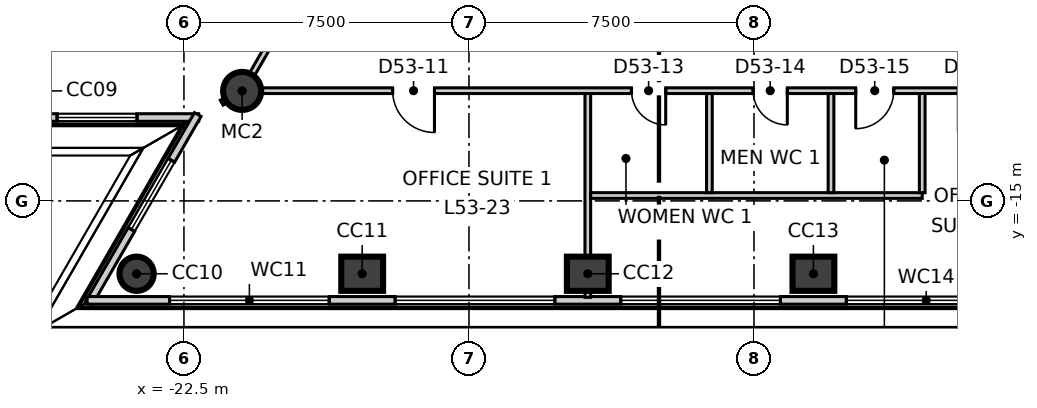
"""IFC4 building model, lengths in metres.
Left out: names, types, materials, properties, quantities, classifications, styles, units other than length and angle.
Written with IfcOpenShell. Run it as: python <this file> out.ifc"""

import sys

from ifc_helpers import new_model, si_unit, direction, frame, frame_2d, origin, origin_2d, place, context, subcontext, project, spatial, rectangle, circle, extrude, element, fill, save


model = new_model("IFC4")
c1 = context("Model", 3, precision=1e-05, world=origin(), true_north=direction((0.0, 1.0)))
c2 = subcontext(c1, "Body", "Model", "MODEL_VIEW")
j1 = project(units=[si_unit("LENGTHUNIT", "METRE"), si_unit("PLANEANGLEUNIT", "RADIAN")], contexts=[c1])
p1 = place(None, origin())
s1 = spatial("IfcSite", under=j1, at=p1, CompositionType="ELEMENT")
p2 = place(p1, origin())
s2 = spatial("IfcBuilding", under=s1, at=p2, CompositionType="ELEMENT")
p3 = place(p2, frame((0.0, 0.0, 227.3)))
s3 = spatial("IfcBuildingStorey", under=s2, at=p3, CompositionType="ELEMENT", Elevation=227.3)
p4 = place(p3, frame((-23.746, -16.917, -0.3), z_axis=(0.0, 0.0, 1.0), x_axis=(1.0, 0.0, 0.0)))
e1 = element("IfcColumn", 1, at=p4, inside=s3, PredefinedType="COLUMN", context=c2, shape_type="SweptSolid", body=[
    extrude(circle(Radius=0.45, at=origin_2d()), origin(), (0.0, 0.0, 1.0), 4.0),
])
for number, where, z_axis, x_axis in (
    (2, (-17.81, -16.917, -0.3), (0.0, 0.0, 1.0), (1.0, 0.0, 0.0)),
    (3, (-11.873, -16.917, -0.3), (0.0, 0.0, 1.0), (1.0, 0.0, 0.0)),
    (4, (-5.936, -16.917, -0.3), (0.0, 0.0, 1.0), (1.0, 0.0, 0.0)),
):
    element("IfcColumn", number, at=place(p3, frame(where, z_axis=z_axis, x_axis=x_axis)), inside=s3, PredefinedType="COLUMN", context=c2, shape_type="SweptSolid", body=[
        extrude(rectangle(XDim=1.1, YDim=0.9, at=origin_2d()), origin(), (0.0, 0.0, 1.0), 4.0),
    ])
p5 = place(p3, frame((-20.969, -12.106, -0.3), z_axis=(0.0, 0.0, 1.0), x_axis=(1.0, 0.0, 0.0)))
e5 = element("IfcColumn", 5, at=p5, inside=s3, PredefinedType="COLUMN", context=c2, shape_type="SweptSolid", body=[
    extrude(circle(Radius=0.5, at=origin_2d()), origin(), (0.0, 0.0, 1.0), 4.0),
])
p6 = place(p3, frame((-2.732, 30.501, 0.0), z_axis=(0.0, 0.0, 1.0), x_axis=(-0.500023345841, -0.866011924637, 0.0)))
e6 = element("IfcWall", 6, at=p6, inside=s3, PredefinedType="ELEMENTEDWALL", context=c2, shape_type="SweptSolid", body=[
    extrude(rectangle(XDim=50.078, YDim=0.2, at=frame_2d((25.039, 0.0))), origin(), (0.0, 0.0, 1.0), 3.7),
])
p7 = place(p6, frame((2.171, 0.0, 0.9)))
e7 = element("IfcOpeningElement", 7, at=p7, cuts=e6, PredefinedType="OPENING", context=c2, shape_type="SweptSolid", body=[
    extrude(rectangle(XDim=4.2, YDim=2.5, at=frame_2d((2.1, 1.25))), frame((0.0, 0.11, 0.0), z_axis=(0.0, -1.0, 0.0), x_axis=(1.0, 0.0, 0.0)), (0.0, 0.0, 1.0), 0.22),
])
p8 = place(p6, frame((8.107, 0.0, 0.9)))
e8 = element("IfcOpeningElement", 8, at=p8, cuts=e6, PredefinedType="OPENING", context=c2, shape_type="SweptSolid", body=[
    extrude(rectangle(XDim=4.2, YDim=2.5, at=frame_2d((2.1, 1.25))), frame((0.0, 0.11, 0.0), z_axis=(0.0, -1.0, 0.0), x_axis=(1.0, 0.0, 0.0)), (0.0, 0.0, 1.0), 0.22),
])
p9 = place(p6, frame((14.044, 0.0, 0.9)))
e9 = element("IfcOpeningElement", 9, at=p9, cuts=e6, PredefinedType="OPENING", context=c2, shape_type="SweptSolid", body=[
    extrude(rectangle(XDim=4.2, YDim=2.5, at=frame_2d((2.1, 1.25))), frame((0.0, 0.11, 0.0), z_axis=(0.0, -1.0, 0.0), x_axis=(1.0, 0.0, 0.0)), (0.0, 0.0, 1.0), 0.22),
])
p10 = place(p6, frame((19.98, 0.0, 0.9)))
e10 = element("IfcOpeningElement", 10, at=p10, cuts=e6, PredefinedType="OPENING", context=c2, shape_type="SweptSolid", body=[
    extrude(rectangle(XDim=4.2, YDim=2.5, at=frame_2d((2.1, 1.25))), frame((0.0, 0.11, 0.0), z_axis=(0.0, -1.0, 0.0), x_axis=(1.0, 0.0, 0.0)), (0.0, 0.0, 1.0), 0.22),
])
p11 = place(p6, frame((25.917, 0.0, 0.9)))
e11 = element("IfcOpeningElement", 11, at=p11, cuts=e6, PredefinedType="OPENING", context=c2, shape_type="SweptSolid", body=[
    extrude(rectangle(XDim=4.2, YDim=2.5, at=frame_2d((2.1, 1.25))), frame((0.0, 0.11, 0.0), z_axis=(0.0, -1.0, 0.0), x_axis=(1.0, 0.0, 0.0)), (0.0, 0.0, 1.0), 0.22),
])
p12 = place(p6, frame((31.853, 0.0, 0.9)))
e12 = element("IfcOpeningElement", 12, at=p12, cuts=e6, PredefinedType="OPENING", context=c2, shape_type="SweptSolid", body=[
    extrude(rectangle(XDim=4.2, YDim=2.5, at=frame_2d((2.1, 1.25))), frame((0.0, 0.11, 0.0), z_axis=(0.0, -1.0, 0.0), x_axis=(1.0, 0.0, 0.0)), (0.0, 0.0, 1.0), 0.22),
])
p13 = place(p6, frame((37.79, 0.0, 0.9)))
e13 = element("IfcOpeningElement", 13, at=p13, cuts=e6, PredefinedType="OPENING", context=c2, shape_type="SweptSolid", body=[
    extrude(rectangle(XDim=4.2, YDim=2.5, at=frame_2d((2.1, 1.25))), frame((0.0, 0.11, 0.0), z_axis=(0.0, -1.0, 0.0), x_axis=(1.0, 0.0, 0.0)), (0.0, 0.0, 1.0), 0.22),
])
p14 = place(p6, frame((43.726, 0.0, 0.9)))
e14 = element("IfcOpeningElement", 14, at=p14, cuts=e6, PredefinedType="OPENING", context=c2, shape_type="SweptSolid", body=[
    extrude(rectangle(XDim=4.2, YDim=2.5, at=frame_2d((2.1, 1.25))), frame((0.0, 0.11, 0.0), z_axis=(0.0, -1.0, 0.0), x_axis=(1.0, 0.0, 0.0)), (0.0, 0.0, 1.0), 0.22),
])
p15 = place(p3, frame((-27.827, -12.806, 0.0), z_axis=(0.0, 0.0, 1.0), x_axis=(1.0, 0.0, 0.0)))
e15 = element("IfcWall", 15, at=p15, inside=s3, PredefinedType="ELEMENTEDWALL", context=c2, shape_type="SweptSolid", body=[
    extrude(rectangle(XDim=5.715, YDim=0.2, at=frame_2d((2.857, 0.0))), origin(), (0.0, 0.0, 1.0), 3.7),
])
p16 = place(p15, frame((1.99, 0.0, 0.9)))
e16 = element("IfcOpeningElement", 16, at=p16, cuts=e15, PredefinedType="OPENING", context=c2, shape_type="SweptSolid", body=[
    extrude(rectangle(XDim=2.1, YDim=2.5, at=frame_2d((1.05, 1.25))), frame((0.0, 0.11, 0.0), z_axis=(0.0, -1.0, 0.0), x_axis=(1.0, 0.0, 0.0)), (0.0, 0.0, 1.0), 0.22),
])
p17 = place(p3, frame((-22.137, -12.728, 0.0), z_axis=(0.0, 0.0, 1.0), x_axis=(-0.49987899677, -0.866095253761, 0.0)))
e17 = element("IfcWall", 17, at=p17, inside=s3, PredefinedType="ELEMENTEDWALL", context=c2, shape_type="SweptSolid", body=[
    extrude(rectangle(XDim=5.715, YDim=0.2, at=frame_2d((2.858, 0.0))), origin(), (0.0, 0.0, 1.0), 3.7),
])
p18 = place(p17, frame((1.39, 0.0, 0.9)))
e18 = element("IfcOpeningElement", 18, at=p18, cuts=e17, PredefinedType="OPENING", context=c2, shape_type="SweptSolid", body=[
    extrude(rectangle(XDim=2.1, YDim=2.5, at=frame_2d((1.05, 1.25))), frame((0.0, 0.11, 0.0), z_axis=(0.0, -1.0, 0.0), x_axis=(1.0, 0.0, 0.0)), (0.0, 0.0, 1.0), 0.22),
])
p19 = place(p3, frame((-25.049, -17.617, 0.0), z_axis=(0.0, 0.0, 1.0), x_axis=(1.0, 0.0, 0.0)))
e19 = element("IfcWall", 19, at=p19, inside=s3, PredefinedType="ELEMENTEDWALL", context=c2, shape_type="SweptSolid", body=[
    extrude(rectangle(XDim=50.078, YDim=0.2, at=frame_2d((25.039, 0.0))), origin(), (0.0, 0.0, 1.0), 3.7),
])
p20 = place(p19, frame((2.171, 0.0, 0.9)))
e20 = element("IfcOpeningElement", 20, at=p20, cuts=e19, PredefinedType="OPENING", context=c2, shape_type="SweptSolid", body=[
    extrude(rectangle(XDim=4.2, YDim=2.5, at=frame_2d((2.1, 1.25))), frame((0.0, 0.11, 0.0), z_axis=(0.0, -1.0, 0.0), x_axis=(1.0, 0.0, 0.0)), (0.0, 0.0, 1.0), 0.22),
])
p21 = place(p19, frame((8.108, 0.0, 0.9)))
e21 = element("IfcOpeningElement", 21, at=p21, cuts=e19, PredefinedType="OPENING", context=c2, shape_type="SweptSolid", body=[
    extrude(rectangle(XDim=4.2, YDim=2.5, at=frame_2d((2.1, 1.25))), frame((0.0, 0.11, 0.0), z_axis=(0.0, -1.0, 0.0), x_axis=(1.0, 0.0, 0.0)), (0.0, 0.0, 1.0), 0.22),
])
p22 = place(p19, frame((14.044, 0.0, 0.9)))
e22 = element("IfcOpeningElement", 22, at=p22, cuts=e19, PredefinedType="OPENING", context=c2, shape_type="SweptSolid", body=[
    extrude(rectangle(XDim=4.2, YDim=2.5, at=frame_2d((2.1, 1.25))), frame((0.0, 0.11, 0.0), z_axis=(0.0, -1.0, 0.0), x_axis=(1.0, 0.0, 0.0)), (0.0, 0.0, 1.0), 0.22),
])
p23 = place(p19, frame((19.981, 0.0, 0.9)))
e23 = element("IfcOpeningElement", 23, at=p23, cuts=e19, PredefinedType="OPENING", context=c2, shape_type="SweptSolid", body=[
    extrude(rectangle(XDim=4.2, YDim=2.5, at=frame_2d((2.1, 1.25))), frame((0.0, 0.11, 0.0), z_axis=(0.0, -1.0, 0.0), x_axis=(1.0, 0.0, 0.0)), (0.0, 0.0, 1.0), 0.22),
])
p24 = place(p19, frame((25.917, 0.0, 0.9)))
e24 = element("IfcOpeningElement", 24, at=p24, cuts=e19, PredefinedType="OPENING", context=c2, shape_type="SweptSolid", body=[
    extrude(rectangle(XDim=4.2, YDim=2.5, at=frame_2d((2.1, 1.25))), frame((0.0, 0.11, 0.0), z_axis=(0.0, -1.0, 0.0), x_axis=(1.0, 0.0, 0.0)), (0.0, 0.0, 1.0), 0.22),
])
p25 = place(p19, frame((31.854, 0.0, 0.9)))
e25 = element("IfcOpeningElement", 25, at=p25, cuts=e19, PredefinedType="OPENING", context=c2, shape_type="SweptSolid", body=[
    extrude(rectangle(XDim=4.2, YDim=2.5, at=frame_2d((2.1, 1.25))), frame((0.0, 0.11, 0.0), z_axis=(0.0, -1.0, 0.0), x_axis=(1.0, 0.0, 0.0)), (0.0, 0.0, 1.0), 0.22),
])
p26 = place(p19, frame((37.79, 0.0, 0.9)))
e26 = element("IfcOpeningElement", 26, at=p26, cuts=e19, PredefinedType="OPENING", context=c2, shape_type="SweptSolid", body=[
    extrude(rectangle(XDim=4.2, YDim=2.5, at=frame_2d((2.1, 1.25))), frame((0.0, 0.11, 0.0), z_axis=(0.0, -1.0, 0.0), x_axis=(1.0, 0.0, 0.0)), (0.0, 0.0, 1.0), 0.22),
])
p27 = place(p19, frame((43.727, 0.0, 0.9)))
e27 = element("IfcOpeningElement", 27, at=p27, cuts=e19, PredefinedType="OPENING", context=c2, shape_type="SweptSolid", body=[
    extrude(rectangle(XDim=4.2, YDim=2.5, at=frame_2d((2.1, 1.25))), frame((0.0, 0.11, 0.0), z_axis=(0.0, -1.0, 0.0), x_axis=(1.0, 0.0, 0.0)), (0.0, 0.0, 1.0), 0.22),
])
p28 = place(p3, frame((-21.506, -12.416, 0.0), z_axis=(0.0, 0.0, 1.0), x_axis=(0.866102227088, 0.499866914522, 0.0)))
e28 = element("IfcWall", 28, at=p28, inside=s3, PredefinedType="PARTITIONING", context=c2, shape_type="SweptSolid", body=[
    extrude(rectangle(XDim=0.634, YDim=0.15, at=frame_2d((0.317, 0.0))), origin(), (0.0, 0.0, 1.0), 3.7),
])
p29 = place(p3, frame((-20.882, -11.969, 0.0), z_axis=(0.0, 0.0, 1.0), x_axis=(0.499998738735, 0.866026131975, 0.0)))
e29 = element("IfcWall", 29, at=p29, inside=s3, PredefinedType="PARTITIONING", context=c2, shape_type="SweptSolid", body=[
    extrude(rectangle(XDim=41.764, YDim=0.15, at=frame_2d((20.882, 0.0))), origin(), (0.0, 0.0, 1.0), 3.7),
])
p30 = place(p29, frame((33.714, 0.0, 0.0)))
e30 = element("IfcOpeningElement", 30, at=p30, cuts=e29, PredefinedType="OPENING", context=c2, shape_type="SweptSolid", body=[
    extrude(rectangle(XDim=1.1, YDim=2.1, at=frame_2d((0.55, 1.05))), frame((0.0, 0.085, 0.0), z_axis=(0.0, -1.0, 0.0), x_axis=(1.0, 0.0, 0.0)), (0.0, 0.0, 1.0), 0.17),
])
p31 = place(p29, frame((23.293, 0.0, 0.0)))
e31 = element("IfcOpeningElement", 31, at=p31, cuts=e29, PredefinedType="OPENING", context=c2, shape_type="SweptSolid", body=[
    extrude(rectangle(XDim=1.0, YDim=2.1, at=frame_2d((0.5, 1.05))), frame((0.0, 0.085, 0.0), z_axis=(0.0, -1.0, 0.0), x_axis=(1.0, 0.0, 0.0)), (0.0, 0.0, 1.0), 0.17),
])
p32 = place(p29, frame((13.356, 0.0, 0.0)))
e32 = element("IfcOpeningElement", 32, at=p32, cuts=e29, PredefinedType="OPENING", context=c2, shape_type="SweptSolid", body=[
    extrude(rectangle(XDim=1.1, YDim=2.1, at=frame_2d((0.55, 1.05))), frame((0.0, 0.085, 0.0), z_axis=(0.0, -1.0, 0.0), x_axis=(1.0, 0.0, 0.0)), (0.0, 0.0, 1.0), 0.17),
])
p33 = place(p29, frame((18.556, 0.0, 0.0)))
e33 = element("IfcOpeningElement", 33, at=p33, cuts=e29, PredefinedType="OPENING", context=c2, shape_type="SweptSolid", body=[
    extrude(rectangle(XDim=0.9, YDim=2.1, at=frame_2d((0.45, 1.05))), frame((0.0, 0.085, 0.0), z_axis=(0.0, -1.0, 0.0), x_axis=(1.0, 0.0, 0.0)), (0.0, 0.0, 1.0), 0.17),
])
p34 = place(p29, frame((15.556, 0.0, 0.0)))
e34 = element("IfcOpeningElement", 34, at=p34, cuts=e29, PredefinedType="OPENING", context=c2, shape_type="SweptSolid", body=[
    extrude(rectangle(XDim=0.9, YDim=2.1, at=frame_2d((0.45, 1.05))), frame((0.0, 0.085, 0.0), z_axis=(0.0, -1.0, 0.0), x_axis=(1.0, 0.0, 0.0)), (0.0, 0.0, 1.0), 0.17),
])
p35 = place(p29, frame((3.883, 0.0, 0.0)))
e35 = element("IfcOpeningElement", 35, at=p35, cuts=e29, PredefinedType="OPENING", context=c2, shape_type="SweptSolid", body=[
    extrude(rectangle(XDim=1.1, YDim=2.1, at=frame_2d((0.55, 1.05))), frame((0.0, 0.085, 0.0), z_axis=(0.0, -1.0, 0.0), x_axis=(1.0, 0.0, 0.0)), (0.0, 0.0, 1.0), 0.17),
])
p36 = place(p3, frame((-20.808, -12.1, 0.0), z_axis=(0.0, 0.0, 1.0), x_axis=(1.0, 0.0, 0.0)))
e36 = element("IfcWall", 36, at=p36, inside=s3, PredefinedType="PARTITIONING", context=c2, shape_type="SweptSolid", body=[
    extrude(rectangle(XDim=41.766, YDim=0.15, at=frame_2d((20.883, 0.0))), origin(), (0.0, 0.0, 1.0), 3.7),
])
p37 = place(p36, frame((3.8, 0.0, 0.0)))
e37 = element("IfcOpeningElement", 37, at=p37, cuts=e36, PredefinedType="OPENING", context=c2, shape_type="SweptSolid", body=[
    extrude(rectangle(XDim=1.1, YDim=2.1, at=frame_2d((0.55, 1.05))), frame((0.0, 0.085, 0.0), z_axis=(0.0, -1.0, 0.0), x_axis=(1.0, 0.0, 0.0)), (0.0, 0.0, 1.0), 0.17),
])
p38 = place(p36, frame((18.685, 0.0, 0.0)))
e38 = element("IfcOpeningElement", 38, at=p38, cuts=e36, PredefinedType="OPENING", context=c2, shape_type="SweptSolid", body=[
    extrude(rectangle(XDim=1.1, YDim=2.1, at=frame_2d((0.55, 1.05))), frame((0.0, 0.085, 0.0), z_axis=(0.0, -1.0, 0.0), x_axis=(1.0, 0.0, 0.0)), (0.0, 0.0, 1.0), 0.17),
])
p39 = place(p36, frame((10.085, 0.0, 0.0)))
e39 = element("IfcOpeningElement", 39, at=p39, cuts=e36, PredefinedType="OPENING", context=c2, shape_type="SweptSolid", body=[
    extrude(rectangle(XDim=0.9, YDim=2.1, at=frame_2d((0.45, 1.05))), frame((0.0, 0.085, 0.0), z_axis=(0.0, -1.0, 0.0), x_axis=(1.0, 0.0, 0.0)), (0.0, 0.0, 1.0), 0.17),
])
p40 = place(p36, frame((13.285, 0.0, 0.0)))
e40 = element("IfcOpeningElement", 40, at=p40, cuts=e36, PredefinedType="OPENING", context=c2, shape_type="SweptSolid", body=[
    extrude(rectangle(XDim=0.9, YDim=2.1, at=frame_2d((0.45, 1.05))), frame((0.0, 0.085, 0.0), z_axis=(0.0, -1.0, 0.0), x_axis=(1.0, 0.0, 0.0)), (0.0, 0.0, 1.0), 0.17),
])
p41 = place(p36, frame((15.985, 0.0, 0.0)))
e41 = element("IfcOpeningElement", 41, at=p41, cuts=e36, PredefinedType="OPENING", context=c2, shape_type="SweptSolid", body=[
    extrude(rectangle(XDim=1.0, YDim=2.1, at=frame_2d((0.5, 1.05))), frame((0.0, 0.085, 0.0), z_axis=(0.0, -1.0, 0.0), x_axis=(1.0, 0.0, 0.0)), (0.0, 0.0, 1.0), 0.17),
])
p42 = place(p36, frame((29.158, 0.0, 0.0)))
e42 = element("IfcOpeningElement", 42, at=p42, cuts=e36, PredefinedType="OPENING", context=c2, shape_type="SweptSolid", body=[
    extrude(rectangle(XDim=1.1, YDim=2.1, at=frame_2d((0.55, 1.05))), frame((0.0, 0.085, 0.0), z_axis=(0.0, -1.0, 0.0), x_axis=(1.0, 0.0, 0.0)), (0.0, 0.0, 1.0), 0.17),
])
p43 = place(p36, frame((22.158, 0.0, 0.0)))
e43 = element("IfcOpeningElement", 43, at=p43, cuts=e36, PredefinedType="OPENING", context=c2, shape_type="SweptSolid", body=[
    extrude(rectangle(XDim=0.9, YDim=2.1, at=frame_2d((0.45, 1.05))), frame((0.0, 0.085, 0.0), z_axis=(0.0, -1.0, 0.0), x_axis=(1.0, 0.0, 0.0)), (0.0, 0.0, 1.0), 0.17),
])
p44 = place(p36, frame((25.158, 0.0, 0.0)))
e44 = element("IfcOpeningElement", 44, at=p44, cuts=e36, PredefinedType="OPENING", context=c2, shape_type="SweptSolid", body=[
    extrude(rectangle(XDim=0.9, YDim=2.1, at=frame_2d((0.45, 1.05))), frame((0.0, 0.085, 0.0), z_axis=(0.0, -1.0, 0.0), x_axis=(1.0, 0.0, 0.0)), (0.0, 0.0, 1.0), 0.17),
])
p45 = place(p36, frame((36.731, 0.0, 0.0)))
e45 = element("IfcOpeningElement", 45, at=p45, cuts=e36, PredefinedType="OPENING", context=c2, shape_type="SweptSolid", body=[
    extrude(rectangle(XDim=1.0, YDim=2.1, at=frame_2d((0.5, 1.05))), frame((0.0, 0.085, 0.0), z_axis=(0.0, -1.0, 0.0), x_axis=(1.0, 0.0, 0.0)), (0.0, 0.0, 1.0), 0.17),
])
p46 = place(p3, frame((-11.873, -17.537, 0.0), z_axis=(0.0, 0.0, 1.0), x_axis=(0.0, 1.0, 0.0)))
e46 = element("IfcWall", 46, at=p46, inside=s3, PredefinedType="PARTITIONING", context=c2, shape_type="SweptSolid", body=[
    extrude(rectangle(XDim=5.362, YDim=0.15, at=frame_2d((2.681, 0.0))), origin(), (0.0, 0.0, 1.0), 3.7),
])
p47 = place(p3, frame((-11.798, -14.858, 0.0), z_axis=(0.0, 0.0, 1.0), x_axis=(1.0, 0.0, 0.0)))
e47 = element("IfcWall", 47, at=p47, inside=s3, PredefinedType="PARTITIONING", context=c2, shape_type="SweptSolid", body=[
    extrude(rectangle(XDim=8.725, YDim=0.15, at=frame_2d((4.363, 0.0))), origin(), (0.0, 0.0, 1.0), 3.7),
])
p48 = place(p3, frame((-8.673, -14.783, 0.0), z_axis=(0.0, 0.0, 1.0), x_axis=(0.0, 1.0, 0.0)))
e48 = element("IfcWall", 48, at=p48, inside=s3, PredefinedType="PARTITIONING", context=c2, shape_type="SweptSolid", body=[
    extrude(rectangle(XDim=2.608, YDim=0.15, at=frame_2d((1.304, 0.0))), origin(), (0.0, 0.0, 1.0), 3.7),
])
p49 = place(p3, frame((-3.073, -14.784, 0.0), z_axis=(0.0, 0.0, 1.0), x_axis=(0.0, 1.0, 0.0)))
e49 = element("IfcWall", 49, at=p49, inside=s3, PredefinedType="PARTITIONING", context=c2, shape_type="SweptSolid", body=[
    extrude(rectangle(XDim=2.609, YDim=0.15, at=frame_2d((1.304, 0.0))), origin(), (0.0, 0.0, 1.0), 3.7),
])
p50 = place(p3, frame((-5.473, -14.783, 0.0), z_axis=(0.0, 0.0, 1.0), x_axis=(0.0, 1.0, 0.0)))
e50 = element("IfcWall", 50, at=p50, inside=s3, PredefinedType="PARTITIONING", context=c2, shape_type="SweptSolid", body=[
    extrude(rectangle(XDim=2.608, YDim=0.15, at=frame_2d((1.304, 0.0))), origin(), (0.0, 0.0, 1.0), 3.7),
])
p51 = place(p16, origin())
e51 = element("IfcWindow", 51, at=p51, inside=s3, PartitioningType="SINGLE_PANEL", PredefinedType="WINDOW", context=c2, shape_type="SweptSolid", body=[
    extrude(rectangle(XDim=2.1, YDim=2.5, at=frame_2d((1.05, 1.25))), frame((0.0, 0.03, 0.0), z_axis=(0.0, -1.0, 0.0), x_axis=(1.0, 0.0, 0.0)), (0.0, 0.0, 1.0), 0.06),
])
fill(e16, e51)
p52 = place(p18, origin())
e52 = element("IfcWindow", 52, at=p52, inside=s3, PartitioningType="SINGLE_PANEL", PredefinedType="WINDOW", context=c2, shape_type="SweptSolid", body=[
    extrude(rectangle(XDim=2.1, YDim=2.5, at=frame_2d((1.05, 1.25))), frame((0.0, 0.03, 0.0), z_axis=(0.0, -1.0, 0.0), x_axis=(1.0, 0.0, 0.0)), (0.0, 0.0, 1.0), 0.06),
])
fill(e18, e52)
p53 = place(p20, origin())
e53 = element("IfcWindow", 53, at=p53, inside=s3, PartitioningType="SINGLE_PANEL", PredefinedType="WINDOW", context=c2, shape_type="SweptSolid", body=[
    extrude(rectangle(XDim=4.2, YDim=2.5, at=frame_2d((2.1, 1.25))), frame((0.0, 0.03, 0.0), z_axis=(0.0, -1.0, 0.0), x_axis=(1.0, 0.0, 0.0)), (0.0, 0.0, 1.0), 0.06),
])
fill(e20, e53)
p54 = place(p21, origin())
e54 = element("IfcWindow", 54, at=p54, inside=s3, PartitioningType="SINGLE_PANEL", PredefinedType="WINDOW", context=c2, shape_type="SweptSolid", body=[
    extrude(rectangle(XDim=4.2, YDim=2.5, at=frame_2d((2.1, 1.25))), frame((0.0, 0.03, 0.0), z_axis=(0.0, -1.0, 0.0), x_axis=(1.0, 0.0, 0.0)), (0.0, 0.0, 1.0), 0.06),
])
fill(e21, e54)
p55 = place(p22, origin())
e55 = element("IfcWindow", 55, at=p55, inside=s3, PartitioningType="SINGLE_PANEL", PredefinedType="WINDOW", context=c2, shape_type="SweptSolid", body=[
    extrude(rectangle(XDim=4.2, YDim=2.5, at=frame_2d((2.1, 1.25))), frame((0.0, 0.03, 0.0), z_axis=(0.0, -1.0, 0.0), x_axis=(1.0, 0.0, 0.0)), (0.0, 0.0, 1.0), 0.06),
])
fill(e22, e55)
p56 = place(p23, origin())
e56 = element("IfcWindow", 56, at=p56, inside=s3, PartitioningType="SINGLE_PANEL", PredefinedType="WINDOW", context=c2, shape_type="SweptSolid", body=[
    extrude(rectangle(XDim=4.2, YDim=2.5, at=frame_2d((2.1, 1.25))), frame((0.0, 0.03, 0.0), z_axis=(0.0, -1.0, 0.0), x_axis=(1.0, 0.0, 0.0)), (0.0, 0.0, 1.0), 0.06),
])
fill(e23, e56)
p57 = place(p37, origin())
e57 = element("IfcDoor", 57, at=p57, inside=s3, OperationType="SINGLE_SWING_RIGHT", PredefinedType="DOOR", context=c2, shape_type="SweptSolid", body=[
    extrude(rectangle(XDim=1.1, YDim=2.1, at=frame_2d((0.55, 1.05))), frame((0.0, 0.025, 0.0), z_axis=(0.0, -1.0, 0.0), x_axis=(1.0, 0.0, 0.0)), (0.0, 0.0, 1.0), 0.05),
])
fill(e37, e57)
p58 = place(p39, origin())
e58 = element("IfcDoor", 58, at=p58, inside=s3, OperationType="SINGLE_SWING_RIGHT", PredefinedType="DOOR", context=c2, shape_type="SweptSolid", body=[
    extrude(rectangle(XDim=0.9, YDim=2.1, at=frame_2d((0.45, 1.05))), frame((0.0, 0.025, 0.0), z_axis=(0.0, -1.0, 0.0), x_axis=(1.0, 0.0, 0.0)), (0.0, 0.0, 1.0), 0.05),
])
fill(e39, e58)
p59 = place(p40, origin())
e59 = element("IfcDoor", 59, at=p59, inside=s3, OperationType="SINGLE_SWING_RIGHT", PredefinedType="DOOR", context=c2, shape_type="SweptSolid", body=[
    extrude(rectangle(XDim=0.9, YDim=2.1, at=frame_2d((0.45, 1.05))), frame((0.0, 0.025, 0.0), z_axis=(0.0, -1.0, 0.0), x_axis=(1.0, 0.0, 0.0)), (0.0, 0.0, 1.0), 0.05),
])
fill(e40, e59)
p60 = place(p41, origin())
e60 = element("IfcDoor", 60, at=p60, inside=s3, OperationType="SINGLE_SWING_LEFT", PredefinedType="DOOR", context=c2, shape_type="SweptSolid", body=[
    extrude(rectangle(XDim=1.0, YDim=2.1, at=frame_2d((0.5, 1.05))), frame((0.0, 0.025, 0.0), z_axis=(0.0, -1.0, 0.0), x_axis=(1.0, 0.0, 0.0)), (0.0, 0.0, 1.0), 0.05),
])
fill(e41, e60)
save(model, sys.argv[1])
